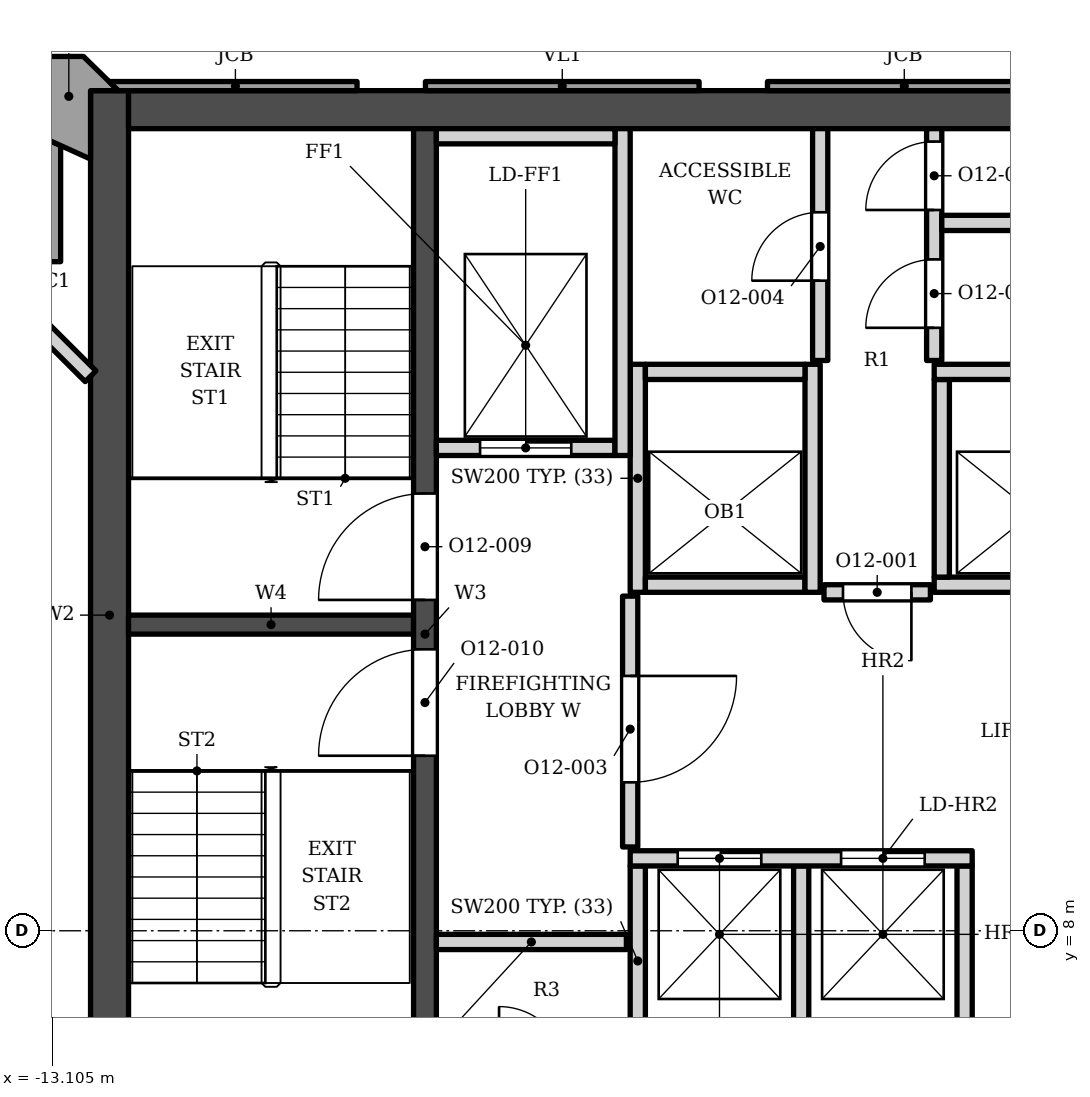
"""IFC4 building model, lengths in metres.
Left out: names, types, materials, properties, quantities, classifications, styles, units other than length and angle.
Written with IfcOpenShell. Run it as: python <this file> out.ifc"""

import sys

from ifc_helpers import new_model, si_unit, direction, frame, frame_2d, origin, place, context, subcontext, project, spatial, polyline, rectangle, outline, extrude, element, fill, save


model = new_model("IFC4")
c1 = context("Model", 3, precision=1e-05, world=origin(), true_north=direction((0.0, 1.0)))
c2 = subcontext(c1, "Body", "Model", "MODEL_VIEW")
j1 = project(units=[si_unit("LENGTHUNIT", "METRE"), si_unit("PLANEANGLEUNIT", "RADIAN")], contexts=[c1])
p1 = place(None, origin())
s1 = spatial("IfcSite", under=j1, at=p1, CompositionType="ELEMENT")
p2 = place(p1, origin())
s2 = spatial("IfcBuilding", under=s1, at=p2, CompositionType="ELEMENT")
p3 = place(p2, frame((0.0, 0.0, 279.4)))
s3 = spatial("IfcBuildingStorey", under=s2, at=p3, CompositionType="ELEMENT", Elevation=279.4)
p4 = place(p3, frame((-12.1, 18.802, 0.0), z_axis=(0.0, 0.0, 1.0), x_axis=(1.0, 0.0, 0.0)))
e1 = element("IfcWall", 1, at=p4, inside=s3, PredefinedType="SHEAR", context=c2, shape_type="SweptSolid", body=[
    extrude(rectangle(XDim=24.2, YDim=0.5, at=frame_2d((12.1, 0.0))), origin(), (0.0, 0.0, 1.0), 3.9),
])
p5 = place(p3, frame((-12.35, 5.253, 0.0), z_axis=(0.0, 0.0, 1.0), x_axis=(0.0, 1.0, 0.0)))
e2 = element("IfcWall", 2, at=p5, inside=s3, PredefinedType="SHEAR", context=c2, shape_type="SweptSolid", body=[
    extrude(rectangle(XDim=13.8, YDim=0.5, at=frame_2d((6.9, 0.0))), origin(), (0.0, 0.0, 1.0), 3.9),
])
p6 = place(p3, frame((-8.2, 5.253, 0.0), z_axis=(0.0, 0.0, 1.0), x_axis=(0.0, 1.0, 0.0)))
e3 = element("IfcWall", 3, at=p6, inside=s3, PredefinedType="SHEAR", context=c2, shape_type="SweptSolid", body=[
    extrude(rectangle(XDim=13.3, YDim=0.3, at=frame_2d((6.65, 0.0))), origin(), (0.0, 0.0, 1.0), 3.9),
])
p7 = place(p6, frame((7.1, 0.0, 0.0)))
e4 = element("IfcOpeningElement", 4, at=p7, cuts=e3, PredefinedType="OPENING", context=c2, shape_type="SweptSolid", body=[
    extrude(rectangle(XDim=1.4, YDim=2.1, at=frame_2d((0.7, 1.05))), frame((0.0, 0.16, 0.0), z_axis=(0.0, -1.0, 0.0), x_axis=(1.0, 0.0, 0.0)), (0.0, 0.0, 1.0), 0.32),
])
p8 = place(p6, frame((5.05, 0.0, 0.0)))
e5 = element("IfcOpeningElement", 5, at=p8, cuts=e3, PredefinedType="OPENING", context=c2, shape_type="SweptSolid", body=[
    extrude(rectangle(XDim=1.4, YDim=2.1, at=frame_2d((0.7, 1.05))), frame((0.0, 0.16, 0.0), z_axis=(0.0, -1.0, 0.0), x_axis=(1.0, 0.0, 0.0)), (0.0, 0.0, 1.0), 0.32),
])
p9 = place(p3, frame((-12.1, 12.028, 0.0), z_axis=(0.0, 0.0, 1.0), x_axis=(1.0, 0.0, 0.0)))
e6 = element("IfcWall", 6, at=p9, inside=s3, PredefinedType="SHEAR", context=c2, shape_type="SweptSolid", body=[
    extrude(rectangle(XDim=3.75, YDim=0.25, at=frame_2d((1.875, 0.0))), origin(), (0.0, 0.0, 1.0), 3.9),
])
p10 = place(p3, origin())
e7 = element("IfcWall", 7, at=p10, inside=s3, PredefinedType="SOLIDWALL", context=c2, shape_type="SweptSolid", body=[
    extrude(outline(polyline([(-12.234, 19.052), (-12.694, 19.502), (-13.594, 19.502), (-13.594, 18.603), (-12.6, 18.152), (-12.6, 19.052), (-12.234, 19.052)])), origin(), (0.0, 0.0, 1.0), 3.0),
])
p11 = place(p3, origin())
e8 = element("IfcWall", 8, at=p11, inside=s3, PredefinedType="SOLIDWALL", context=c2, shape_type="SweptSolid", body=[
    extrude(outline(polyline([(-13.294, 16.802), (-12.994, 16.802), (-12.994, 18.331), (-13.294, 18.467), (-13.294, 17.153), (-13.294, 16.802)])), origin(), (0.0, 0.0, 1.0), 3.0),
])
p12 = place(p3, origin())
e9 = element("IfcWall", 9, at=p12, inside=s3, PredefinedType="SOLIDWALL", context=c2, shape_type="SweptSolid", body=[
    extrude(outline(polyline([(-3.694, 19.173), (-3.694, 19.052), (-0.094, 19.052), (-0.094, 19.173), (-3.694, 19.173)])), origin(), (0.0, 0.0, 1.0), 3.0),
])
p13 = place(p3, origin())
e10 = element("IfcWall", 10, at=p13, inside=s3, PredefinedType="ELEMENTEDWALL", context=c2, shape_type="SweptSolid", body=[
    extrude(outline(polyline([(-8.194, 19.173), (-8.194, 19.052), (-4.594, 19.052), (-4.594, 19.173), (-8.194, 19.173)])), origin(), (0.0, 0.0, 1.0), 3.0),
])
p14 = place(p3, origin())
e11 = element("IfcWall", 11, at=p14, inside=s3, PredefinedType="SOLIDWALL", context=c2, shape_type="SweptSolid", body=[
    extrude(outline(polyline([(-12.233, 19.052), (-9.094, 19.052), (-9.094, 19.173), (-12.355, 19.173), (-12.233, 19.052)])), origin(), (0.0, 0.0, 1.0), 3.0),
])
for number, where, z_axis, x_axis in (
    (12, (-5.4, 6.353, 0.0), (0.0, 0.0, 1.0), (0.0, 1.0, 0.0)),
    (13, (-3.25, 6.353, 0.0), (0.0, 0.0, 1.0), (0.0, 1.0, 0.0)),
    (14, (-1.1, 6.353, 0.0), (0.0, 0.0, 1.0), (0.0, 1.0, 0.0)),
    (15, (-8.05, 7.853, 0.0), (0.0, 0.0, 1.0), (1.0, 0.0, 0.0)),
):
    element("IfcWall", number, at=place(p3, frame(where, z_axis=z_axis, x_axis=x_axis)), inside=s3, PredefinedType="SOLIDWALL", context=c2, shape_type="SweptSolid", body=[
        extrude(rectangle(XDim=2.5, YDim=0.2, at=frame_2d((1.25, 0.0))), origin(), (0.0, 0.0, 1.0), 3.73),
    ])
p15 = place(p3, frame((-5.5, 8.953, 0.0), z_axis=(0.0, 0.0, 1.0), x_axis=(1.0, 0.0, 0.0)))
e16 = element("IfcWall", 16, at=p15, inside=s3, PredefinedType="SOLIDWALL", context=c2, shape_type="SweptSolid", body=[
    extrude(rectangle(XDim=4.5, YDim=0.2, at=frame_2d((2.25, 0.0))), origin(), (0.0, 0.0, 1.0), 3.73),
])
p16 = place(p15, frame((0.625, 0.0, 0.0)))
e17 = element("IfcOpeningElement", 17, at=p16, cuts=e16, PredefinedType="OPENING", context=c2, shape_type="SweptSolid", body=[
    extrude(rectangle(XDim=1.1, YDim=2.1, at=frame_2d((0.55, 1.05))), frame((0.0, 0.11, 0.0), z_axis=(0.0, -1.0, 0.0), x_axis=(1.0, 0.0, 0.0)), (0.0, 0.0, 1.0), 0.22),
])
p17 = place(p15, frame((2.775, 0.0, 0.0)))
e18 = element("IfcOpeningElement", 18, at=p17, cuts=e16, PredefinedType="OPENING", context=c2, shape_type="SweptSolid", body=[
    extrude(rectangle(XDim=1.1, YDim=2.1, at=frame_2d((0.55, 1.05))), frame((0.0, 0.11, 0.0), z_axis=(0.0, -1.0, 0.0), x_axis=(1.0, 0.0, 0.0)), (0.0, 0.0, 1.0), 0.22),
])
p18 = place(p3, frame((-5.5, 9.103, 0.0), z_axis=(0.0, 0.0, 1.0), x_axis=(0.0, 1.0, 0.0)))
e19 = element("IfcWall", 19, at=p18, inside=s3, PredefinedType="SOLIDWALL", context=c2, shape_type="SweptSolid", body=[
    extrude(rectangle(XDim=3.3, YDim=0.2, at=frame_2d((1.65, 0.0))), origin(), (0.0, 0.0, 1.0), 3.73),
])
p19 = place(p18, frame((0.85, 0.0, 0.0)))
e20 = element("IfcOpeningElement", 20, at=p19, cuts=e19, PredefinedType="OPENING", context=c2, shape_type="SweptSolid", body=[
    extrude(rectangle(XDim=1.4, YDim=2.1, at=frame_2d((0.7, 1.05))), frame((0.0, 0.11, 0.0), z_axis=(0.0, -1.0, 0.0), x_axis=(1.0, 0.0, 0.0)), (0.0, 0.0, 1.0), 0.22),
])
p20 = place(p3, frame((-2.95, 12.453, 0.0), z_axis=(0.0, 0.0, 1.0), x_axis=(1.0, 0.0, 0.0)))
e21 = element("IfcWall", 21, at=p20, inside=s3, PredefinedType="SOLIDWALL", context=c2, shape_type="SweptSolid", body=[
    extrude(rectangle(XDim=1.4, YDim=0.2, at=frame_2d((0.7, 0.0))), origin(), (0.0, 0.0, 1.0), 3.73),
])
p21 = place(p20, frame((0.25, 0.0, 0.0)))
e22 = element("IfcOpeningElement", 22, at=p21, cuts=e21, PredefinedType="OPENING", context=c2, shape_type="SweptSolid", body=[
    extrude(rectangle(XDim=0.9, YDim=2.1, at=frame_2d((0.45, 1.05))), frame((0.0, 0.11, 0.0), z_axis=(0.0, -1.0, 0.0), x_axis=(1.0, 0.0, 0.0)), (0.0, 0.0, 1.0), 0.22),
])
p22 = place(p3, frame((-5.4, 12.453, 0.0), z_axis=(0.0, 0.0, 1.0), x_axis=(0.0, 1.0, 0.0)))
e23 = element("IfcWall", 23, at=p22, inside=s3, PredefinedType="SOLIDWALL", context=c2, shape_type="SweptSolid", body=[
    extrude(rectangle(XDim=3.0, YDim=0.2, at=frame_2d((1.5, 0.0))), origin(), (0.0, 0.0, 1.0), 3.73),
])
p23 = place(p3, frame((-5.3, 12.552, 0.0), z_axis=(0.0, 0.0, 1.0), x_axis=(1.0, 0.0, 0.0)))
e24 = element("IfcWall", 24, at=p23, inside=s3, PredefinedType="SOLIDWALL", context=c2, shape_type="SweptSolid", body=[
    extrude(rectangle(XDim=2.1, YDim=0.2, at=frame_2d((1.05, 0.0))), origin(), (0.0, 0.0, 1.0), 3.73),
])
p24 = place(p3, frame((-3.1, 12.453, 0.0), z_axis=(0.0, 0.0, 1.0), x_axis=(0.0, 1.0, 0.0)))
e25 = element("IfcWall", 25, at=p24, inside=s3, PredefinedType="SOLIDWALL", context=c2, shape_type="SweptSolid", body=[
    extrude(rectangle(XDim=3.0, YDim=0.2, at=frame_2d((1.5, 0.0))), origin(), (0.0, 0.0, 1.0), 3.73),
])
p25 = place(p3, frame((-1.5, 12.552, 0.0), z_axis=(0.0, 0.0, 1.0), x_axis=(1.0, 0.0, 0.0)))
e26 = element("IfcWall", 26, at=p25, inside=s3, PredefinedType="SOLIDWALL", context=c2, shape_type="SweptSolid", body=[
    extrude(rectangle(XDim=7.0, YDim=0.2, at=frame_2d((3.5, 0.0))), origin(), (0.0, 0.0, 1.0), 3.73),
])
p26 = place(p25, frame((3.075, 0.0, 0.0)))
e27 = element("IfcOpeningElement", 27, at=p26, cuts=e26, PredefinedType="OPENING", context=c2, shape_type="SweptSolid", body=[
    extrude(rectangle(XDim=1.1, YDim=2.1, at=frame_2d((0.55, 1.05))), frame((0.0, 0.11, 0.0), z_axis=(0.0, -1.0, 0.0), x_axis=(1.0, 0.0, 0.0)), (0.0, 0.0, 1.0), 0.22),
])
p27 = place(p25, frame((5.275, 0.0, 0.0)))
e28 = element("IfcOpeningElement", 28, at=p27, cuts=e26, PredefinedType="OPENING", context=c2, shape_type="SweptSolid", body=[
    extrude(rectangle(XDim=1.1, YDim=2.1, at=frame_2d((0.55, 1.05))), frame((0.0, 0.11, 0.0), z_axis=(0.0, -1.0, 0.0), x_axis=(1.0, 0.0, 0.0)), (0.0, 0.0, 1.0), 0.22),
])
p28 = place(p3, frame((-1.4, 12.653, 0.0), z_axis=(0.0, 0.0, 1.0), x_axis=(0.0, 1.0, 0.0)))
e29 = element("IfcWall", 29, at=p28, inside=s3, PredefinedType="SOLIDWALL", context=c2, shape_type="SweptSolid", body=[
    extrude(rectangle(XDim=2.6, YDim=0.2, at=frame_2d((1.3, 0.0))), origin(), (0.0, 0.0, 1.0), 3.73),
])
p29 = place(p3, frame((-8.05, 14.353, 0.0), z_axis=(0.0, 0.0, 1.0), x_axis=(1.0, 0.0, 0.0)))
e30 = element("IfcWall", 30, at=p29, inside=s3, PredefinedType="SOLIDWALL", context=c2, shape_type="SweptSolid", body=[
    extrude(rectangle(XDim=2.35, YDim=0.2, at=frame_2d((1.175, 0.0))), origin(), (0.0, 0.0, 1.0), 3.73),
])
p30 = place(p29, frame((0.575, 0.0, 0.0)))
e31 = element("IfcOpeningElement", 31, at=p30, cuts=e30, PredefinedType="OPENING", context=c2, shape_type="SweptSolid", body=[
    extrude(rectangle(XDim=1.2, YDim=2.1, at=frame_2d((0.6, 1.05))), frame((0.0, 0.11, 0.0), z_axis=(0.0, -1.0, 0.0), x_axis=(1.0, 0.0, 0.0)), (0.0, 0.0, 1.0), 0.22),
])
p31 = place(p3, frame((-5.6, 14.253, 0.0), z_axis=(0.0, 0.0, 1.0), x_axis=(0.0, 1.0, 0.0)))
e32 = element("IfcWall", 32, at=p31, inside=s3, PredefinedType="SOLIDWALL", context=c2, shape_type="SweptSolid", body=[
    extrude(rectangle(XDim=4.3, YDim=0.2, at=frame_2d((2.15, 0.0))), origin(), (0.0, 0.0, 1.0), 3.73),
])
p32 = place(p3, frame((-5.3, 15.353, 0.0), z_axis=(0.0, 0.0, 1.0), x_axis=(1.0, 0.0, 0.0)))
e33 = element("IfcWall", 33, at=p32, inside=s3, PredefinedType="SOLIDWALL", context=c2, shape_type="SweptSolid", body=[
    extrude(rectangle(XDim=2.1, YDim=0.2, at=frame_2d((1.05, 0.0))), origin(), (0.0, 0.0, 1.0), 3.73),
])
p33 = place(p3, frame((-1.5, 15.353, 0.0), z_axis=(0.0, 0.0, 1.0), x_axis=(1.0, 0.0, 0.0)))
e34 = element("IfcWall", 34, at=p33, inside=s3, PredefinedType="SOLIDWALL", context=c2, shape_type="SweptSolid", body=[
    extrude(rectangle(XDim=7.2, YDim=0.2, at=frame_2d((3.6, 0.0))), origin(), (0.0, 0.0, 1.0), 3.73),
])
p34 = place(p3, frame((-3.0, 15.503, 0.0), z_axis=(0.0, 0.0, 1.0), x_axis=(0.0, 1.0, 0.0)))
e35 = element("IfcWall", 35, at=p34, inside=s3, PredefinedType="SOLIDWALL", context=c2, shape_type="SweptSolid", body=[
    extrude(rectangle(XDim=3.05, YDim=0.2, at=frame_2d((1.525, 0.0))), origin(), (0.0, 0.0, 1.0), 3.73),
])
p35 = place(p34, frame((1.05, 0.0, 0.0)))
e36 = element("IfcOpeningElement", 36, at=p35, cuts=e35, PredefinedType="OPENING", context=c2, shape_type="SweptSolid", body=[
    extrude(rectangle(XDim=0.9, YDim=2.1, at=frame_2d((0.45, 1.05))), frame((0.0, 0.11, 0.0), z_axis=(0.0, -1.0, 0.0), x_axis=(1.0, 0.0, 0.0)), (0.0, 0.0, 1.0), 0.22),
])
p36 = place(p3, frame((-1.5, 15.503, 0.0), z_axis=(0.0, 0.0, 1.0), x_axis=(0.0, 1.0, 0.0)))
e37 = element("IfcWall", 37, at=p36, inside=s3, PredefinedType="SOLIDWALL", context=c2, shape_type="SweptSolid", body=[
    extrude(rectangle(XDim=3.05, YDim=0.2, at=frame_2d((1.525, 0.0))), origin(), (0.0, 0.0, 1.0), 3.73),
])
p37 = place(p36, frame((0.43, 0.0, 0.0)))
e38 = element("IfcOpeningElement", 38, at=p37, cuts=e37, PredefinedType="OPENING", context=c2, shape_type="SweptSolid", body=[
    extrude(rectangle(XDim=0.9, YDim=2.1, at=frame_2d((0.45, 1.05))), frame((0.0, 0.11, 0.0), z_axis=(0.0, -1.0, 0.0), x_axis=(1.0, 0.0, 0.0)), (0.0, 0.0, 1.0), 0.22),
])
p38 = place(p36, frame((1.98, 0.0, 0.0)))
e39 = element("IfcOpeningElement", 39, at=p38, cuts=e37, PredefinedType="OPENING", context=c2, shape_type="SweptSolid", body=[
    extrude(rectangle(XDim=0.9, YDim=2.1, at=frame_2d((0.45, 1.05))), frame((0.0, 0.11, 0.0), z_axis=(0.0, -1.0, 0.0), x_axis=(1.0, 0.0, 0.0)), (0.0, 0.0, 1.0), 0.22),
])
p39 = place(p3, frame((-1.4, 17.312, 0.0), z_axis=(0.0, 0.0, 1.0), x_axis=(1.0, 0.0, 0.0)))
e40 = element("IfcWall", 40, at=p39, inside=s3, PredefinedType="SOLIDWALL", context=c2, shape_type="SweptSolid", body=[
    extrude(rectangle(XDim=6.85, YDim=0.2, at=frame_2d((3.425, 0.0))), origin(), (0.0, 0.0, 1.0), 3.73),
])
p40 = place(p3, frame((-8.05, 18.453, 0.0), z_axis=(0.0, 0.0, 1.0), x_axis=(1.0, 0.0, 0.0)))
e41 = element("IfcWall", 41, at=p40, inside=s3, PredefinedType="SOLIDWALL", context=c2, shape_type="SweptSolid", body=[
    extrude(rectangle(XDim=2.35, YDim=0.2, at=frame_2d((1.175, 0.0))), origin(), (0.0, 0.0, 1.0), 3.73),
])
p41 = place(p3, frame((-13.26, 15.953, 0.0), z_axis=(0.0, 0.0, 1.0), x_axis=(0.708285399161, -0.705926195389, 0.0)))
e42 = element("IfcWall", 42, at=p41, inside=s3, PredefinedType="PARTITIONING", context=c2, shape_type="SweptSolid", body=[
    extrude(rectangle(XDim=0.931, YDim=0.2, at=frame_2d((0.466, 0.0))), origin(), (0.0, 0.0, 1.0), 3.73),
])
p42 = place(p16, origin())
e43 = element("IfcDoor", 43, at=p42, inside=s3, OperationType="DOUBLE_DOOR_SLIDING", PredefinedType="DOOR", context=c2, shape_type="SweptSolid", body=[
    extrude(rectangle(XDim=1.1, YDim=2.1, at=frame_2d((0.55, 1.05))), frame((0.0, 0.025, 0.0), z_axis=(0.0, -1.0, 0.0), x_axis=(1.0, 0.0, 0.0)), (0.0, 0.0, 1.0), 0.05),
])
fill(e17, e43)
p43 = place(p17, origin())
e44 = element("IfcDoor", 44, at=p43, inside=s3, OperationType="DOUBLE_DOOR_SLIDING", PredefinedType="DOOR", context=c2, shape_type="SweptSolid", body=[
    extrude(rectangle(XDim=1.1, YDim=2.1, at=frame_2d((0.55, 1.05))), frame((0.0, 0.025, 0.0), z_axis=(0.0, -1.0, 0.0), x_axis=(1.0, 0.0, 0.0)), (0.0, 0.0, 1.0), 0.05),
])
fill(e18, e44)
p44 = place(p30, origin())
e45 = element("IfcDoor", 45, at=p44, inside=s3, OperationType="DOUBLE_DOOR_SLIDING", PredefinedType="DOOR", context=c2, shape_type="SweptSolid", body=[
    extrude(rectangle(XDim=1.2, YDim=2.1, at=frame_2d((0.6, 1.05))), frame((0.0, 0.025, 0.0), z_axis=(0.0, -1.0, 0.0), x_axis=(1.0, 0.0, 0.0)), (0.0, 0.0, 1.0), 0.05),
])
fill(e31, e45)
p45 = place(p7, origin())
e46 = element("IfcDoor", 46, at=p45, inside=s3, OperationType="SINGLE_SWING_LEFT", PredefinedType="DOOR", context=c2, shape_type="SweptSolid", body=[
    extrude(rectangle(XDim=1.4, YDim=2.1, at=frame_2d((0.7, 1.05))), frame((0.0, 0.025, 0.0), z_axis=(0.0, -1.0, 0.0), x_axis=(1.0, 0.0, 0.0)), (0.0, 0.0, 1.0), 0.05),
])
fill(e4, e46)
p46 = place(p8, origin())
e47 = element("IfcDoor", 47, at=p46, inside=s3, OperationType="SINGLE_SWING_LEFT", PredefinedType="DOOR", context=c2, shape_type="SweptSolid", body=[
    extrude(rectangle(XDim=1.4, YDim=2.1, at=frame_2d((0.7, 1.05))), frame((0.0, 0.025, 0.0), z_axis=(0.0, -1.0, 0.0), x_axis=(1.0, 0.0, 0.0)), (0.0, 0.0, 1.0), 0.05),
])
fill(e5, e47)
p47 = place(p21, origin())
e48 = element("IfcDoor", 48, at=p47, inside=s3, OperationType="SINGLE_SWING_RIGHT", PredefinedType="DOOR", context=c2, shape_type="SweptSolid", body=[
    extrude(rectangle(XDim=0.9, YDim=2.1, at=frame_2d((0.45, 1.05))), frame((0.0, 0.025, 0.0), z_axis=(0.0, -1.0, 0.0), x_axis=(1.0, 0.0, 0.0)), (0.0, 0.0, 1.0), 0.05),
])
fill(e22, e48)
p48 = place(p19, origin())
e49 = element("IfcDoor", 49, at=p48, inside=s3, OperationType="SINGLE_SWING_RIGHT", PredefinedType="DOOR", context=c2, shape_type="SweptSolid", body=[
    extrude(rectangle(XDim=1.4, YDim=2.1, at=frame_2d((0.7, 1.05))), frame((0.0, 0.025, 0.0), z_axis=(0.0, -1.0, 0.0), x_axis=(1.0, 0.0, 0.0)), (0.0, 0.0, 1.0), 0.05),
])
fill(e20, e49)
p49 = place(p35, origin())
e50 = element("IfcDoor", 50, at=p49, inside=s3, OperationType="SINGLE_SWING_LEFT", PredefinedType="DOOR", context=c2, shape_type="SweptSolid", body=[
    extrude(rectangle(XDim=0.9, YDim=2.1, at=frame_2d((0.45, 1.05))), frame((0.0, 0.025, 0.0), z_axis=(0.0, -1.0, 0.0), x_axis=(1.0, 0.0, 0.0)), (0.0, 0.0, 1.0), 0.05),
])
fill(e36, e50)
p50 = place(p37, origin())
e51 = element("IfcDoor", 51, at=p50, inside=s3, OperationType="SINGLE_SWING_LEFT", PredefinedType="DOOR", context=c2, shape_type="SweptSolid", body=[
    extrude(rectangle(XDim=0.9, YDim=2.1, at=frame_2d((0.45, 1.05))), frame((0.0, 0.025, 0.0), z_axis=(0.0, -1.0, 0.0), x_axis=(1.0, 0.0, 0.0)), (0.0, 0.0, 1.0), 0.05),
])
fill(e38, e51)
p51 = place(p38, origin())
e52 = element("IfcDoor", 52, at=p51, inside=s3, OperationType="SINGLE_SWING_LEFT", PredefinedType="DOOR", context=c2, shape_type="SweptSolid", body=[
    extrude(rectangle(XDim=0.9, YDim=2.1, at=frame_2d((0.45, 1.05))), frame((0.0, 0.025, 0.0), z_axis=(0.0, -1.0, 0.0), x_axis=(1.0, 0.0, 0.0)), (0.0, 0.0, 1.0), 0.05),
])
fill(e39, e52)
save(model, sys.argv[1])
